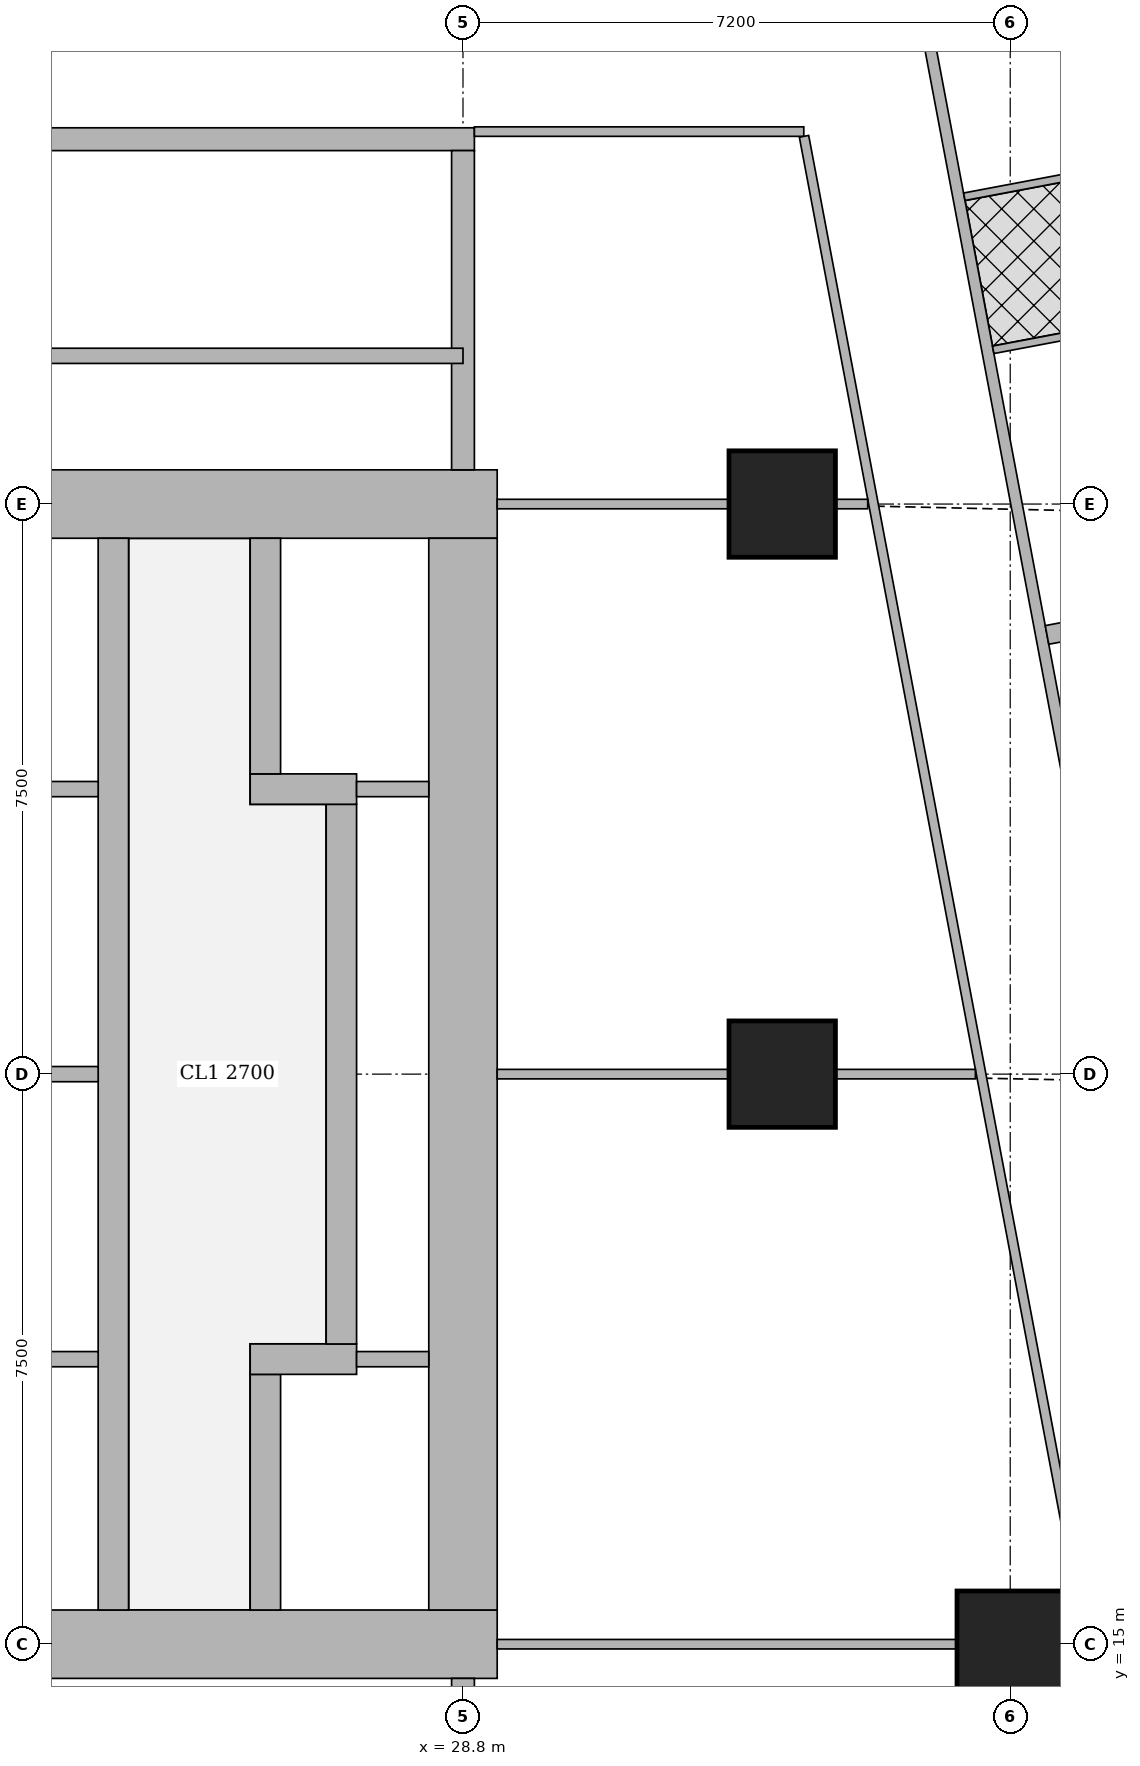
"""IFC4 building model, lengths in metres.
Left out: names, types, materials, properties, quantities, classifications, styles, units other than length and angle.
Written with IfcOpenShell. Run it as: python <this file> out.ifc"""

import sys

from ifc_helpers import new_model, si_unit, direction, frame, frame_2d, origin, origin_2d, place, context, subcontext, project, spatial, rectangle, extrude, element, fill, save


model = new_model("IFC4")
c1 = context("Model", 3, precision=1e-05, world=origin(), true_north=direction((0.0, 1.0)))
c2 = subcontext(c1, "Body", "Model", "MODEL_VIEW")
j1 = project(units=[si_unit("LENGTHUNIT", "METRE"), si_unit("PLANEANGLEUNIT", "RADIAN")], contexts=[c1])
p1 = place(None, origin())
s1 = spatial("IfcSite", under=j1, at=p1, CompositionType="ELEMENT")
p2 = place(p1, origin())
s2 = spatial("IfcBuilding", under=s1, at=p2, CompositionType="ELEMENT")
p3 = place(p2, frame((0.0, 0.0, 274.1)))
s3 = spatial("IfcBuildingStorey", under=s2, at=p3, CompositionType="ELEMENT", Elevation=274.1)
for number, where, z_axis, x_axis in (
    (1, (36.0, 15.0, 0.0), (0.0, 0.0, 1.0), (1.0, 0.0, 0.0)),
    (2, (33.0, 22.5, 0.0), (0.0, 0.0, 1.0), (1.0, 0.0, 0.0)),
    (3, (33.0, 30.0, 0.0), (0.0, 0.0, 1.0), (1.0, 0.0, 0.0)),
):
    element("IfcColumn", number, at=place(p3, frame(where, z_axis=z_axis, x_axis=x_axis)), inside=s3, PredefinedType="COLUMN", context=c2, shape_type="SweptSolid", body=[
        extrude(rectangle(XDim=1.4, YDim=1.4, at=origin_2d()), origin(), (0.0, 0.0, 1.0), 3.75),
    ])
p4 = place(p3, frame((13.95, 15.0, 0.0), z_axis=(0.0, 0.0, 1.0), x_axis=(1.0, 0.0, 0.0)))
e4 = element("IfcWall", 4, at=p4, inside=s3, PredefinedType="SHEAR", context=c2, shape_type="SweptSolid", body=[
    extrude(rectangle(XDim=15.3, YDim=0.9, at=frame_2d((7.65, 0.0))), origin(), (0.0, 0.0, 1.0), 3.75),
])
p5 = place(p4, frame((4.45, 0.0, 0.0)))
e5 = element("IfcOpeningElement", 5, at=p5, cuts=e4, PredefinedType="OPENING", context=c2, shape_type="SweptSolid", body=[
    extrude(rectangle(XDim=1.8, YDim=2.1, at=frame_2d((0.9, 1.05))), frame((0.0, 0.46, 0.0), z_axis=(0.0, -1.0, 0.0), x_axis=(1.0, 0.0, 0.0)), (0.0, 0.0, 1.0), 0.92),
])
p6 = place(p4, frame((10.7, 0.0, 0.0)))
e6 = element("IfcOpeningElement", 6, at=p6, cuts=e4, PredefinedType="OPENING", context=c2, shape_type="SweptSolid", body=[
    extrude(rectangle(XDim=1.1, YDim=2.1, at=frame_2d((0.55, 1.05))), frame((0.0, 0.46, 0.0), z_axis=(0.0, -1.0, 0.0), x_axis=(1.0, 0.0, 0.0)), (0.0, 0.0, 1.0), 0.92),
])
p7 = place(p3, frame((13.95, 30.0, 0.0), z_axis=(0.0, 0.0, 1.0), x_axis=(1.0, 0.0, 0.0)))
e7 = element("IfcWall", 7, at=p7, inside=s3, PredefinedType="SHEAR", context=c2, shape_type="SweptSolid", body=[
    extrude(rectangle(XDim=15.3, YDim=0.9, at=frame_2d((7.65, 0.0))), origin(), (0.0, 0.0, 1.0), 3.75),
])
p8 = place(p7, frame((4.45, 0.0, 0.0)))
e8 = element("IfcOpeningElement", 8, at=p8, cuts=e7, PredefinedType="OPENING", context=c2, shape_type="SweptSolid", body=[
    extrude(rectangle(XDim=1.8, YDim=2.1, at=frame_2d((0.9, 1.05))), frame((0.0, 0.46, 0.0), z_axis=(0.0, -1.0, 0.0), x_axis=(1.0, 0.0, 0.0)), (0.0, 0.0, 1.0), 0.92),
])
p9 = place(p7, frame((10.7, 0.0, 0.0)))
e9 = element("IfcOpeningElement", 9, at=p9, cuts=e7, PredefinedType="OPENING", context=c2, shape_type="SweptSolid", body=[
    extrude(rectangle(XDim=1.1, YDim=2.1, at=frame_2d((0.55, 1.05))), frame((0.0, 0.46, 0.0), z_axis=(0.0, -1.0, 0.0), x_axis=(1.0, 0.0, 0.0)), (0.0, 0.0, 1.0), 0.92),
])
p10 = place(p3, frame((28.8, 15.45, 0.0), z_axis=(0.0, 0.0, 1.0), x_axis=(0.0, 1.0, 0.0)))
e10 = element("IfcWall", 10, at=p10, inside=s3, PredefinedType="SHEAR", context=c2, shape_type="SweptSolid", body=[
    extrude(rectangle(XDim=14.1, YDim=0.9, at=frame_2d((7.05, 0.0))), origin(), (0.0, 0.0, 1.0), 3.75),
])
p11 = place(p3, frame((24.2, 15.45, 0.0), z_axis=(0.0, 0.0, 1.0), x_axis=(0.0, 1.0, 0.0)))
e11 = element("IfcWall", 11, at=p11, inside=s3, PredefinedType="SHEAR", context=c2, shape_type="SweptSolid", body=[
    extrude(rectangle(XDim=14.1, YDim=0.4, at=frame_2d((7.05, 0.0))), origin(), (0.0, 0.0, 1.0), 3.75),
])
p12 = place(p3, frame((26.2, 15.45, 0.0), z_axis=(0.0, 0.0, 1.0), x_axis=(0.0, 1.0, 0.0)))
e12 = element("IfcWall", 12, at=p12, inside=s3, PredefinedType="SHEAR", context=c2, shape_type="SweptSolid", body=[
    extrude(rectangle(XDim=3.1, YDim=0.4, at=frame_2d((1.55, 0.0))), origin(), (0.0, 0.0, 1.0), 3.75),
])
p13 = place(p12, frame((0.825, 0.0, 0.0)))
e13 = element("IfcOpeningElement", 13, at=p13, cuts=e12, PredefinedType="OPENING", context=c2, shape_type="SweptSolid", body=[
    extrude(rectangle(XDim=1.2, YDim=2.1, at=frame_2d((0.6, 1.05))), frame((0.0, 0.21, 0.0), z_axis=(0.0, -1.0, 0.0), x_axis=(1.0, 0.0, 0.0)), (0.0, 0.0, 1.0), 0.42),
])
p14 = place(p3, frame((26.0, 18.75, 0.0), z_axis=(0.0, 0.0, 1.0), x_axis=(1.0, 0.0, 0.0)))
e14 = element("IfcWall", 14, at=p14, inside=s3, PredefinedType="SHEAR", context=c2, shape_type="SweptSolid", body=[
    extrude(rectangle(XDim=1.4, YDim=0.4, at=frame_2d((0.7, 0.0))), origin(), (0.0, 0.0, 1.0), 3.75),
])
p15 = place(p3, frame((27.2, 18.95, 0.0), z_axis=(0.0, 0.0, 1.0), x_axis=(0.0, 1.0, 0.0)))
e15 = element("IfcWall", 15, at=p15, inside=s3, PredefinedType="SHEAR", context=c2, shape_type="SweptSolid", body=[
    extrude(rectangle(XDim=7.1, YDim=0.4, at=frame_2d((3.55, 0.0))), origin(), (0.0, 0.0, 1.0), 3.75),
])
p16 = place(p3, frame((26.0, 26.25, 0.0), z_axis=(0.0, 0.0, 1.0), x_axis=(1.0, 0.0, 0.0)))
e16 = element("IfcWall", 16, at=p16, inside=s3, PredefinedType="SHEAR", context=c2, shape_type="SweptSolid", body=[
    extrude(rectangle(XDim=1.4, YDim=0.4, at=frame_2d((0.7, 0.0))), origin(), (0.0, 0.0, 1.0), 3.75),
])
p17 = place(p3, frame((26.2, 26.45, 0.0), z_axis=(0.0, 0.0, 1.0), x_axis=(0.0, 1.0, 0.0)))
e17 = element("IfcWall", 17, at=p17, inside=s3, PredefinedType="SHEAR", context=c2, shape_type="SweptSolid", body=[
    extrude(rectangle(XDim=3.1, YDim=0.4, at=frame_2d((1.55, 0.0))), origin(), (0.0, 0.0, 1.0), 3.75),
])
p18 = place(p17, frame((1.075, 0.0, 0.0)))
e18 = element("IfcOpeningElement", 18, at=p18, cuts=e17, PredefinedType="OPENING", context=c2, shape_type="SweptSolid", body=[
    extrude(rectangle(XDim=1.2, YDim=2.1, at=frame_2d((0.6, 1.05))), frame((0.0, 0.21, 0.0), z_axis=(0.0, -1.0, 0.0), x_axis=(1.0, 0.0, 0.0)), (0.0, 0.0, 1.0), 0.42),
])
p19 = place(p3, frame((28.8, 10.35, 0.0), z_axis=(0.0, 0.0, 1.0), x_axis=(0.0, 1.0, 0.0)))
e19 = element("IfcWall", 19, at=p19, inside=s3, PredefinedType="SHEAR", context=c2, shape_type="SweptSolid", body=[
    extrude(rectangle(XDim=4.2, YDim=0.3, at=frame_2d((2.1, 0.0))), origin(), (0.0, 0.0, 1.0), 3.75),
])
p20 = place(p3, frame((21.45, 34.8, 0.0), z_axis=(0.0, 0.0, 1.0), x_axis=(1.0, 0.0, 0.0)))
e20 = element("IfcWall", 20, at=p20, inside=s3, PredefinedType="SHEAR", context=c2, shape_type="SweptSolid", body=[
    extrude(rectangle(XDim=7.5, YDim=0.3, at=frame_2d((3.75, 0.0))), origin(), (0.0, 0.0, 1.0), 3.75),
])
p21 = place(p20, frame((0.5, 0.0, 0.0)))
e21 = element("IfcOpeningElement", 21, at=p21, cuts=e20, PredefinedType="OPENING", context=c2, shape_type="SweptSolid", body=[
    extrude(rectangle(XDim=1.1, YDim=2.1, at=frame_2d((0.55, 1.05))), frame((0.0, 0.16, 0.0), z_axis=(0.0, -1.0, 0.0), x_axis=(1.0, 0.0, 0.0)), (0.0, 0.0, 1.0), 0.32),
])
p22 = place(p3, frame((28.8, 30.45, 0.0), z_axis=(0.0, 0.0, 1.0), x_axis=(0.0, 1.0, 0.0)))
e22 = element("IfcWall", 22, at=p22, inside=s3, PredefinedType="SHEAR", context=c2, shape_type="SweptSolid", body=[
    extrude(rectangle(XDim=4.2, YDim=0.3, at=frame_2d((2.1, 0.0))), origin(), (0.0, 0.0, 1.0), 3.75),
])
p23 = place(p3, frame((33.781, 42.186, 0.0), z_axis=(0.0, 0.0, 1.0), x_axis=(0.185593518645, -0.9826266055, 0.0)))
e23 = element("IfcWall", 23, at=p23, inside=s3, PredefinedType="SOLIDWALL", context=c2, shape_type="SweptSolid", body=[
    extrude(rectangle(XDim=35.961, YDim=0.15, at=frame_2d((17.98, 0.0))), origin(), (0.0, 0.0, 1.0), 2.5),
])
p24 = place(p23, frame((11.76, 0.0, 0.0)))
e24 = element("IfcOpeningElement", 24, at=p24, cuts=e23, PredefinedType="OPENING", context=c2, shape_type="SweptSolid", body=[
    extrude(rectangle(XDim=1.0, YDim=2.1, at=frame_2d((0.5, 1.05))), frame((0.0, 0.085, 0.0), z_axis=(0.0, -1.0, 0.0), x_axis=(1.0, 0.0, 0.0)), (0.0, 0.0, 1.0), 0.17),
])
p25 = place(p23, frame((15.576, 0.0, 0.0)))
e25 = element("IfcOpeningElement", 25, at=p25, cuts=e23, PredefinedType="OPENING", context=c2, shape_type="SweptSolid", body=[
    extrude(rectangle(XDim=1.0, YDim=2.1, at=frame_2d((0.5, 1.05))), frame((0.0, 0.085, 0.0), z_axis=(0.0, -1.0, 0.0), x_axis=(1.0, 0.0, 0.0)), (0.0, 0.0, 1.0), 0.17),
])
p26 = place(p23, frame((30.502, 0.0, 0.0)))
e26 = element("IfcOpeningElement", 26, at=p26, cuts=e23, PredefinedType="OPENING", context=c2, shape_type="SweptSolid", body=[
    extrude(rectangle(XDim=1.0, YDim=2.1, at=frame_2d((0.5, 1.05))), frame((0.0, 0.085, 0.0), z_axis=(0.0, -1.0, 0.0), x_axis=(1.0, 0.0, 0.0)), (0.0, 0.0, 1.0), 0.17),
])
p27 = place(p3, frame((39.289, 32.692, 0.0), z_axis=(0.0, 0.0, 1.0), x_axis=(-0.982662827464, -0.185401638399, 0.0)))
e27 = element("IfcWall", 27, at=p27, inside=s3, PredefinedType="PARTITIONING", context=c2, shape_type="SweptSolid", body=[
    extrude(rectangle(XDim=3.575, YDim=0.1, at=frame_2d((1.788, 0.0))), origin(), (0.0, 0.0, 1.0), 3.5),
])
p28 = place(p3, frame((38.859, 34.697, 0.0), z_axis=(0.0, 0.0, 1.0), x_axis=(-0.982626628545, -0.185593396635, 0.0)))
e28 = element("IfcWall", 28, at=p28, inside=s3, PredefinedType="PARTITIONING", context=c2, shape_type="SweptSolid", body=[
    extrude(rectangle(XDim=3.524, YDim=0.1, at=frame_2d((1.762, 0.0))), origin(), (0.0, 0.0, 1.0), 3.5),
])
p29 = place(p3, frame((41.177, 29.164, 0.0), z_axis=(0.0, 0.0, 1.0), x_axis=(-0.982642846239, -0.185507511263, 0.0)))
e29 = element("IfcWall", 29, at=p29, inside=s3, PredefinedType="SOLIDWALL", context=c2, shape_type="SweptSolid", body=[
    extrude(rectangle(XDim=4.776, YDim=0.25, at=frame_2d((2.388, 0.0))), origin(), (0.0, 0.0, 1.0), 2.5),
])
p30 = place(p3, frame((28.95, 34.9, 0.0), z_axis=(0.0, 0.0, 1.0), x_axis=(1.0, 0.0, 0.0)))
e30 = element("IfcWall", 30, at=p30, inside=s3, PredefinedType="PARTITIONING", context=c2, shape_type="SweptSolid", body=[
    extrude(rectangle(XDim=4.334, YDim=0.125, at=frame_2d((2.167, 0.0))), origin(), (0.0, 0.0, 1.0), 3.5),
])
p31 = place(p3, frame((37.947, 10.163, 0.0), z_axis=(0.0, 0.0, 1.0), x_axis=(-0.185572770922, 0.982630523998, 0.0)))
e31 = element("IfcWall", 31, at=p31, inside=s3, PredefinedType="PARTITIONING", context=c2, shape_type="SweptSolid", body=[
    extrude(rectangle(XDim=25.111, YDim=0.125, at=frame_2d((12.556, 0.0))), origin(), (0.0, 0.0, 1.0), 2.5),
])
p32 = place(p31, frame((0.708, 0.0, 0.0)))
e32 = element("IfcOpeningElement", 32, at=p32, cuts=e31, PredefinedType="OPENING", context=c2, shape_type="SweptSolid", body=[
    extrude(rectangle(XDim=1.0, YDim=2.1, at=frame_2d((0.5, 1.05))), frame((0.0, 0.073, 0.0), z_axis=(0.0, -1.0, 0.0), x_axis=(1.0, 0.0, 0.0)), (0.0, 0.0, 1.0), 0.145),
])
p33 = place(p31, frame((5.9, 0.0, 0.0)))
e33 = element("IfcOpeningElement", 33, at=p33, cuts=e31, PredefinedType="OPENING", context=c2, shape_type="SweptSolid", body=[
    extrude(rectangle(XDim=1.0, YDim=2.1, at=frame_2d((0.5, 1.05))), frame((0.0, 0.073, 0.0), z_axis=(0.0, -1.0, 0.0), x_axis=(1.0, 0.0, 0.0)), (0.0, 0.0, 1.0), 0.145),
])
p34 = place(p31, frame((13.378, 0.0, 0.0)))
e34 = element("IfcOpeningElement", 34, at=p34, cuts=e31, PredefinedType="OPENING", context=c2, shape_type="SweptSolid", body=[
    extrude(rectangle(XDim=1.0, YDim=2.1, at=frame_2d((0.5, 1.05))), frame((0.0, 0.073, 0.0), z_axis=(0.0, -1.0, 0.0), x_axis=(1.0, 0.0, 0.0)), (0.0, 0.0, 1.0), 0.145),
])
p35 = place(p31, frame((21.15, 0.0, 0.0)))
e35 = element("IfcOpeningElement", 35, at=p35, cuts=e31, PredefinedType="OPENING", context=c2, shape_type="SweptSolid", body=[
    extrude(rectangle(XDim=1.0, YDim=2.1, at=frame_2d((0.5, 1.05))), frame((0.0, 0.073, 0.0), z_axis=(0.0, -1.0, 0.0), x_axis=(1.0, 0.0, 0.0)), (0.0, 0.0, 1.0), 0.145),
])
p36 = place(p3, frame((29.25, 15.0, 0.0), z_axis=(0.0, 0.0, 1.0), x_axis=(1.0, 0.0, 0.0)))
e36 = element("IfcWall", 36, at=p36, inside=s3, PredefinedType="PARTITIONING", context=c2, shape_type="SweptSolid", body=[
    extrude(rectangle(XDim=6.049, YDim=0.125, at=frame_2d((3.024, 0.0))), origin(), (0.0, 0.0, 1.0), 3.5),
])
p37 = place(p3, frame((29.25, 22.5, 0.0), z_axis=(0.0, 0.0, 1.0), x_axis=(1.0, 0.0, 0.0)))
e37 = element("IfcWall", 37, at=p37, inside=s3, PredefinedType="PARTITIONING", context=c2, shape_type="SweptSolid", body=[
    extrude(rectangle(XDim=3.049, YDim=0.125, at=frame_2d((1.524, 0.0))), origin(), (0.0, 0.0, 1.0), 3.5),
])
p38 = place(p3, frame((33.701, 22.5, 0.0), z_axis=(0.0, 0.0, 1.0), x_axis=(1.0, 0.0, 0.0)))
e38 = element("IfcWall", 38, at=p38, inside=s3, PredefinedType="PARTITIONING", context=c2, shape_type="SweptSolid", body=[
    extrude(rectangle(XDim=1.841, YDim=0.125, at=frame_2d((0.92, 0.0))), origin(), (0.0, 0.0, 1.0), 2.5),
])
p39 = place(p3, frame((29.25, 30.0, 0.0), z_axis=(0.0, 0.0, 1.0), x_axis=(1.0, 0.0, 0.0)))
e39 = element("IfcWall", 39, at=p39, inside=s3, PredefinedType="PARTITIONING", context=c2, shape_type="SweptSolid", body=[
    extrude(rectangle(XDim=3.049, YDim=0.125, at=frame_2d((1.524, 0.0))), origin(), (0.0, 0.0, 1.0), 3.5),
])
p40 = place(p3, frame((33.701, 30.0, 0.0), z_axis=(0.0, 0.0, 1.0), x_axis=(1.0, 0.0, 0.0)))
e40 = element("IfcWall", 40, at=p40, inside=s3, PredefinedType="PARTITIONING", context=c2, shape_type="SweptSolid", body=[
    extrude(rectangle(XDim=0.424, YDim=0.125, at=frame_2d((0.212, 0.0))), origin(), (0.0, 0.0, 1.0), 2.5),
])
p41 = place(p3, frame((23.0, 31.95, 0.0), z_axis=(0.0, 0.0, 1.0), x_axis=(1.0, 0.0, 0.0)))
e41 = element("IfcWall", 41, at=p41, inside=s3, PredefinedType="SHEAR", context=c2, shape_type="SweptSolid", body=[
    extrude(rectangle(XDim=5.8, YDim=0.2, at=frame_2d((2.9, 0.0))), origin(), (0.0, 0.0, 1.0), 3.75),
])
for number, where, z_axis, x_axis in (
    (42, (21.8, 18.75, 0.0), (0.0, 0.0, 1.0), (1.0, 0.0, 0.0)),
    (43, (21.8, 22.5, 0.0), (0.0, 0.0, 1.0), (1.0, 0.0, 0.0)),
    (44, (21.8, 26.25, 0.0), (0.0, 0.0, 1.0), (1.0, 0.0, 0.0)),
):
    element("IfcWall", number, at=place(p3, frame(where, z_axis=z_axis, x_axis=x_axis)), inside=s3, PredefinedType="SOLIDWALL", context=c2, shape_type="SweptSolid", body=[
        extrude(rectangle(XDim=2.2, YDim=0.2, at=frame_2d((1.1, 0.0))), origin(), (0.0, 0.0, 1.0), 3.5),
    ])
for number, where, z_axis, x_axis in (
    (45, (27.4, 18.75, 0.0), (0.0, 0.0, 1.0), (1.0, 0.0, 0.0)),
    (46, (27.4, 26.25, 0.0), (0.0, 0.0, 1.0), (1.0, 0.0, 0.0)),
):
    element("IfcWall", number, at=place(p3, frame(where, z_axis=z_axis, x_axis=x_axis)), inside=s3, PredefinedType="SOLIDWALL", context=c2, shape_type="SweptSolid", body=[
        extrude(rectangle(XDim=0.95, YDim=0.2, at=frame_2d((0.475, 0.0))), origin(), (0.0, 0.0, 1.0), 3.5),
    ])
p42 = place(p24, origin())
e47 = element("IfcDoor", 47, at=p42, inside=s3, OperationType="SINGLE_SWING_LEFT", PredefinedType="DOOR", context=c2, shape_type="SweptSolid", body=[
    extrude(rectangle(XDim=1.0, YDim=2.1, at=frame_2d((0.5, 1.05))), frame((0.0, 0.025, 0.0), z_axis=(0.0, -1.0, 0.0), x_axis=(1.0, 0.0, 0.0)), (0.0, 0.0, 1.0), 0.05),
])
fill(e24, e47)
p43 = place(p25, origin())
e48 = element("IfcDoor", 48, at=p43, inside=s3, OperationType="SINGLE_SWING_RIGHT", PredefinedType="DOOR", context=c2, shape_type="SweptSolid", body=[
    extrude(rectangle(XDim=1.0, YDim=2.1, at=frame_2d((0.5, 1.05))), frame((0.0, 0.025, 0.0), z_axis=(0.0, -1.0, 0.0), x_axis=(1.0, 0.0, 0.0)), (0.0, 0.0, 1.0), 0.05),
])
fill(e25, e48)
p44 = place(p33, origin())
e49 = element("IfcDoor", 49, at=p44, inside=s3, OperationType="SINGLE_SWING_LEFT", PredefinedType="DOOR", context=c2, shape_type="SweptSolid", body=[
    extrude(rectangle(XDim=1.0, YDim=2.1, at=frame_2d((0.5, 1.05))), frame((0.0, 0.025, 0.0), z_axis=(0.0, -1.0, 0.0), x_axis=(1.0, 0.0, 0.0)), (0.0, 0.0, 1.0), 0.05),
])
fill(e33, e49)
p45 = place(p34, origin())
e50 = element("IfcDoor", 50, at=p45, inside=s3, OperationType="SINGLE_SWING_LEFT", PredefinedType="DOOR", context=c2, shape_type="SweptSolid", body=[
    extrude(rectangle(XDim=1.0, YDim=2.1, at=frame_2d((0.5, 1.05))), frame((0.0, 0.025, 0.0), z_axis=(0.0, -1.0, 0.0), x_axis=(1.0, 0.0, 0.0)), (0.0, 0.0, 1.0), 0.05),
])
fill(e34, e50)
p46 = place(p35, origin())
e51 = element("IfcDoor", 51, at=p46, inside=s3, OperationType="SINGLE_SWING_LEFT", PredefinedType="DOOR", context=c2, shape_type="SweptSolid", body=[
    extrude(rectangle(XDim=1.0, YDim=2.1, at=frame_2d((0.5, 1.05))), frame((0.0, 0.025, 0.0), z_axis=(0.0, -1.0, 0.0), x_axis=(1.0, 0.0, 0.0)), (0.0, 0.0, 1.0), 0.05),
])
fill(e35, e51)
p47 = place(p6, origin())
e52 = element("IfcDoor", 52, at=p47, inside=s3, OperationType="SINGLE_SWING_RIGHT", PredefinedType="DOOR", context=c2, shape_type="SweptSolid", body=[
    extrude(rectangle(XDim=1.1, YDim=2.1, at=frame_2d((0.55, 1.05))), frame((0.0, 0.025, 0.0), z_axis=(0.0, -1.0, 0.0), x_axis=(1.0, 0.0, 0.0)), (0.0, 0.0, 1.0), 0.05),
])
fill(e6, e52)
p48 = place(p9, origin())
e53 = element("IfcDoor", 53, at=p48, inside=s3, OperationType="SINGLE_SWING_RIGHT", PredefinedType="DOOR", context=c2, shape_type="SweptSolid", body=[
    extrude(rectangle(XDim=1.1, YDim=2.1, at=frame_2d((0.55, 1.05))), frame((0.0, 0.025, 0.0), z_axis=(0.0, -1.0, 0.0), x_axis=(1.0, 0.0, 0.0)), (0.0, 0.0, 1.0), 0.05),
])
fill(e9, e53)
p49 = place(p13, origin())
e54 = element("IfcDoor", 54, at=p49, inside=s3, OperationType="DOUBLE_DOOR_SLIDING", PredefinedType="DOOR", context=c2, shape_type="SweptSolid", body=[
    extrude(rectangle(XDim=1.2, YDim=2.1, at=frame_2d((0.6, 1.05))), frame((0.0, 0.025, 0.0), z_axis=(0.0, -1.0, 0.0), x_axis=(1.0, 0.0, 0.0)), (0.0, 0.0, 1.0), 0.05),
])
fill(e13, e54)
p50 = place(p18, origin())
e55 = element("IfcDoor", 55, at=p50, inside=s3, OperationType="DOUBLE_DOOR_SLIDING", PredefinedType="DOOR", context=c2, shape_type="SweptSolid", body=[
    extrude(rectangle(XDim=1.2, YDim=2.1, at=frame_2d((0.6, 1.05))), frame((0.0, 0.025, 0.0), z_axis=(0.0, -1.0, 0.0), x_axis=(1.0, 0.0, 0.0)), (0.0, 0.0, 1.0), 0.05),
])
fill(e18, e55)
save(model, sys.argv[1])
